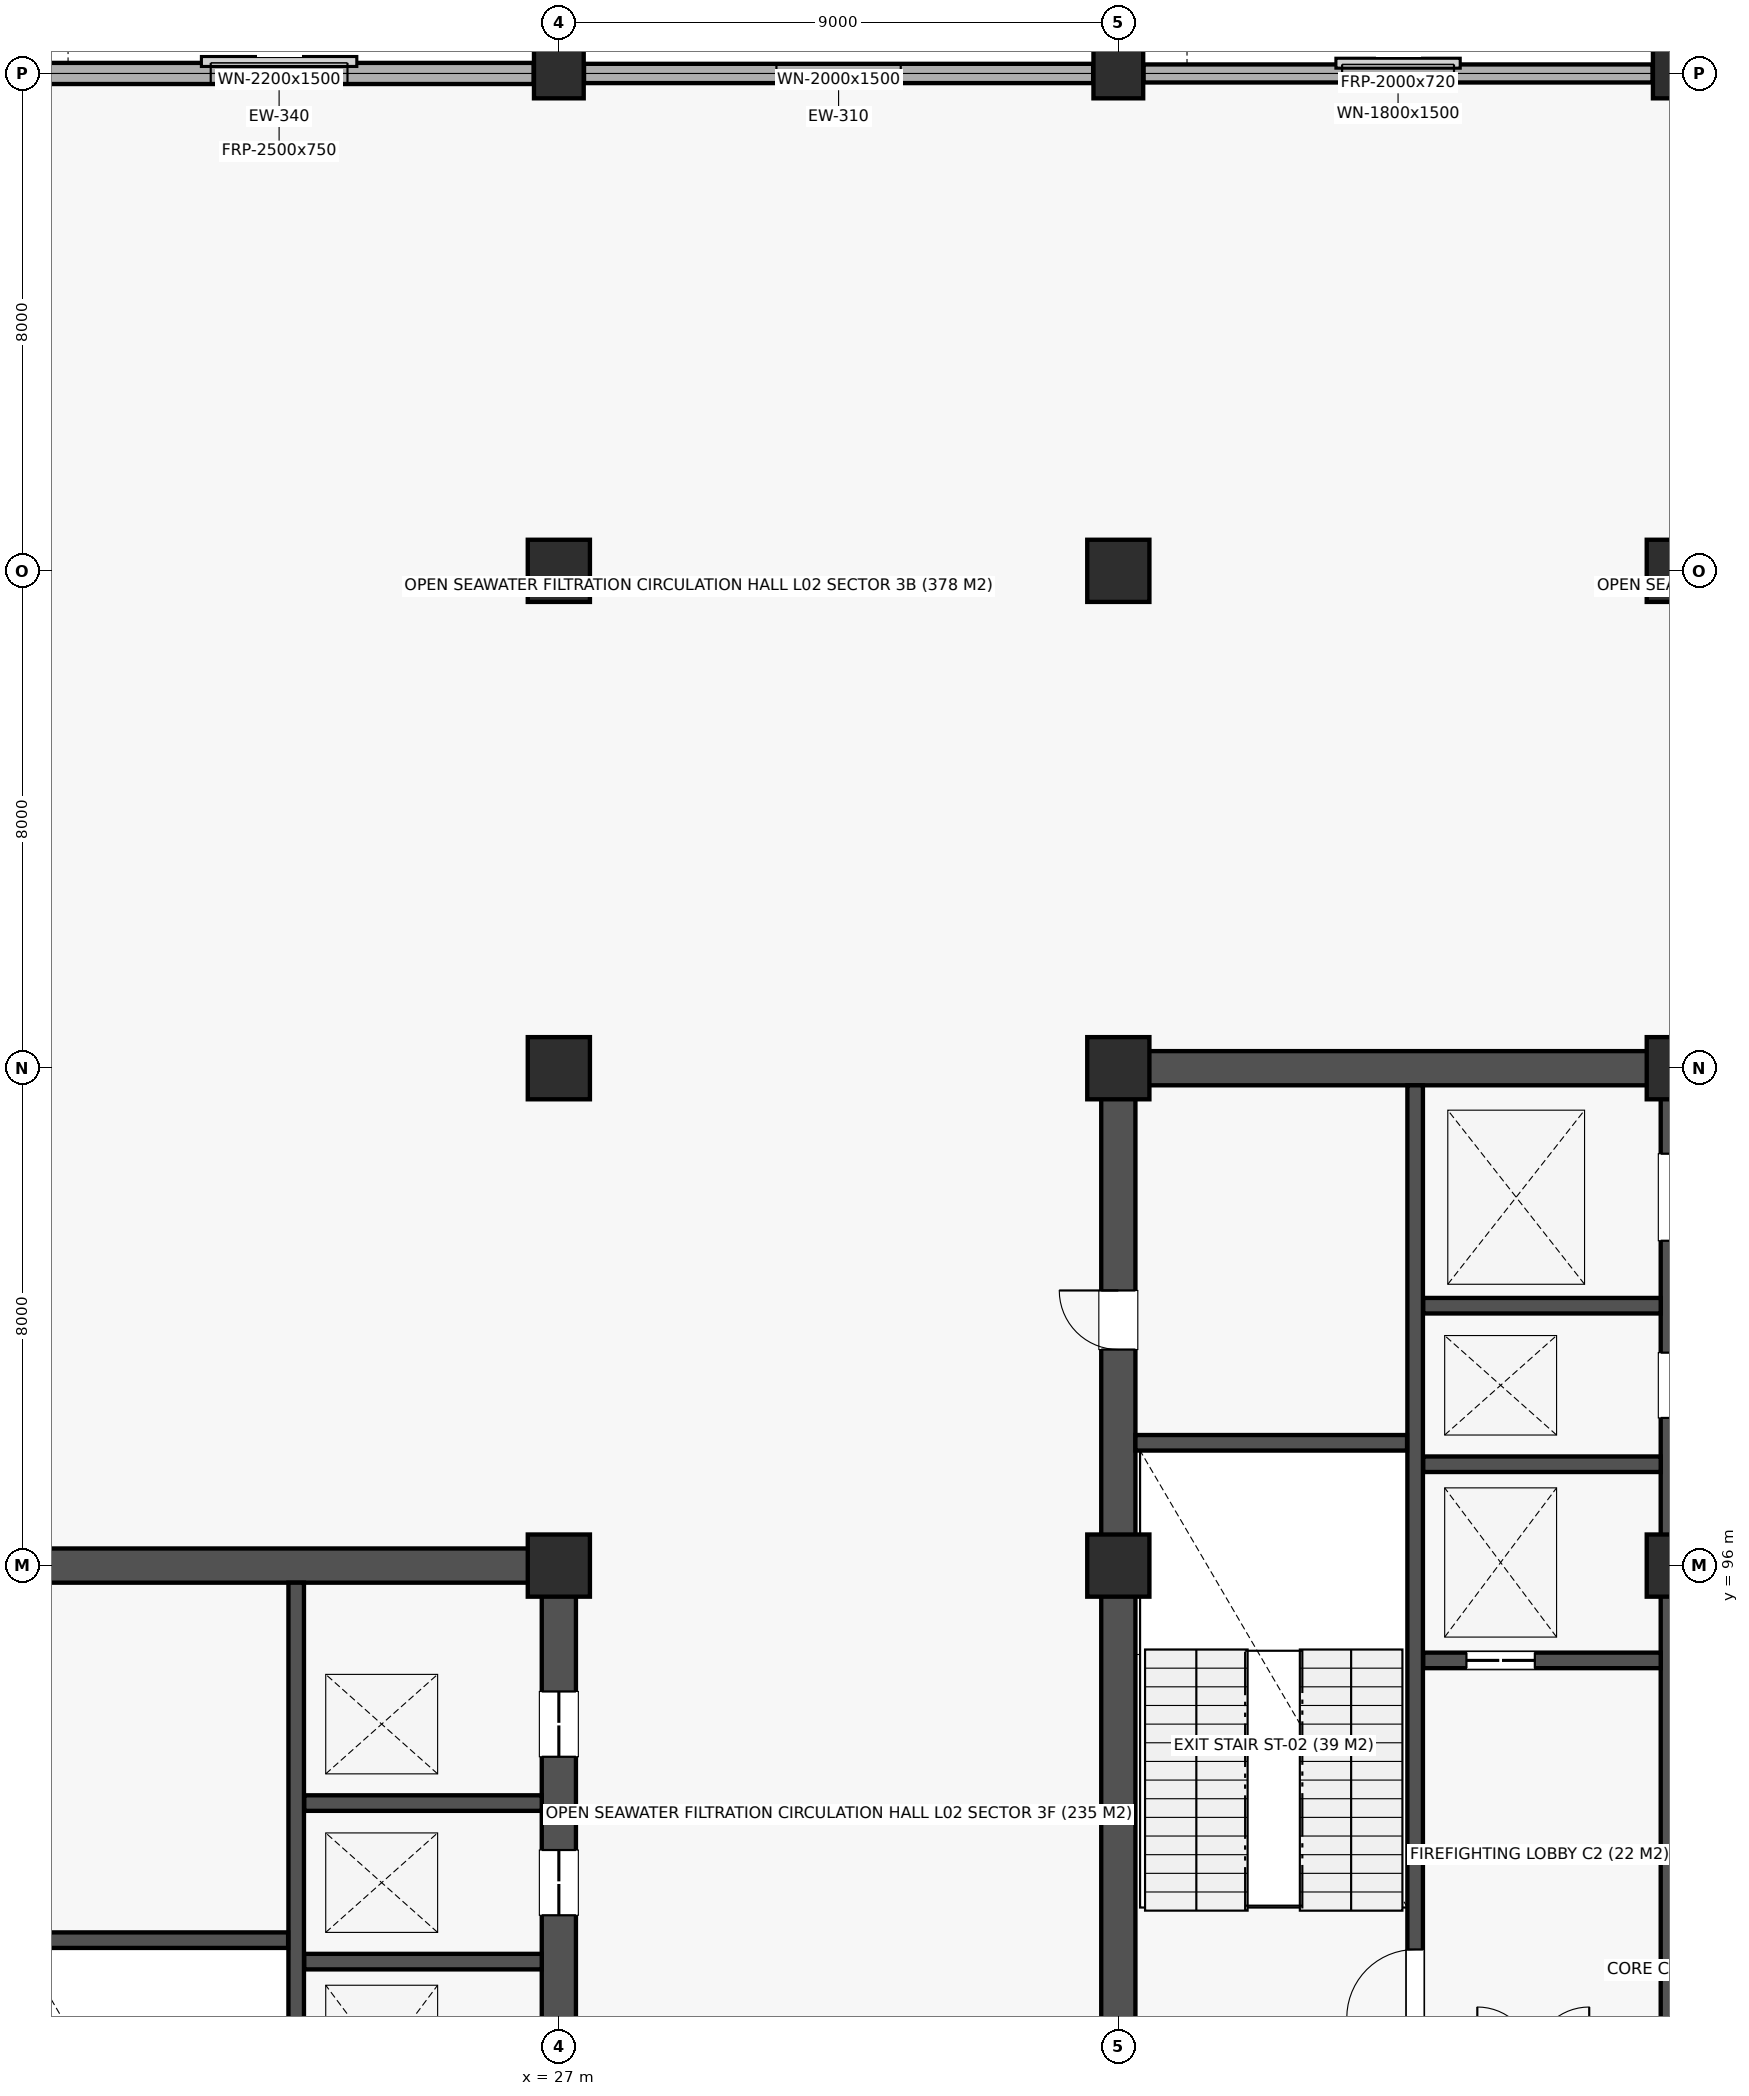
"""IFC4 building model, lengths in metres.
Left out: names, types, materials, properties, quantities, classifications, styles, units other than length and angle.
Written with IfcOpenShell. Run it as: python <this file> out.ifc"""

import sys

from ifc_helpers import new_model, si_unit, direction, frame, frame_2d, origin, origin_2d, place, context, subcontext, project, spatial, rectangle, extrude, element, fill, save


model = new_model("IFC4")
c1 = context("Model", 3, precision=1e-05, world=origin(), true_north=direction((0.0, 1.0)))
c2 = subcontext(c1, "Body", "Model", "MODEL_VIEW")
j1 = project(units=[si_unit("LENGTHUNIT", "METRE"), si_unit("PLANEANGLEUNIT", "RADIAN")], contexts=[c1])
p1 = place(None, origin())
s1 = spatial("IfcSite", under=j1, at=p1, CompositionType="ELEMENT")
p2 = place(p1, origin())
s2 = spatial("IfcBuilding", under=s1, at=p2, CompositionType="ELEMENT")
p3 = place(p2, frame((0.0, 0.0, 9.0)))
s3 = spatial("IfcBuildingStorey", under=s2, at=p3, CompositionType="ELEMENT", Elevation=9.0)
for number, where, z_axis, x_axis in (
    (1, (27.0, 96.0, 0.0), (0.0, 0.0, 1.0), (1.0, 0.0, 0.0)),
    (2, (27.0, 104.0, 0.0), (0.0, 0.0, 1.0), (1.0, 0.0, 0.0)),
    (3, (27.0, 112.0, 0.0), (0.0, 0.0, 1.0), (1.0, 0.0, 0.0)),
):
    element("IfcColumn", number, at=place(p3, frame(where, z_axis=z_axis, x_axis=x_axis)), inside=s3, PredefinedType="COLUMN", context=c2, shape_type="SweptSolid", body=[
        extrude(rectangle(XDim=1.0, YDim=1.0, at=origin_2d()), origin(), (0.0, 0.0, 1.0), 4.5),
    ])
p4 = place(p3, frame((27.0, 120.0, 0.0), z_axis=(0.0, 0.0, 1.0), x_axis=(1.0, 0.0, 0.0)))
e4 = element("IfcColumn", 4, at=p4, inside=s3, PredefinedType="COLUMN", context=c2, shape_type="SweptSolid", body=[
    extrude(rectangle(XDim=0.8, YDim=0.8, at=origin_2d()), origin(), (0.0, 0.0, 1.0), 4.5),
])
for number, where, z_axis, x_axis in (
    (5, (36.0, 96.0, 0.0), (0.0, 0.0, 1.0), (1.0, 0.0, 0.0)),
    (6, (36.0, 104.0, 0.0), (0.0, 0.0, 1.0), (1.0, 0.0, 0.0)),
    (7, (36.0, 112.0, 0.0), (0.0, 0.0, 1.0), (1.0, 0.0, 0.0)),
):
    element("IfcColumn", number, at=place(p3, frame(where, z_axis=z_axis, x_axis=x_axis)), inside=s3, PredefinedType="COLUMN", context=c2, shape_type="SweptSolid", body=[
        extrude(rectangle(XDim=1.0, YDim=1.0, at=origin_2d()), origin(), (0.0, 0.0, 1.0), 4.5),
    ])
p5 = place(p3, frame((36.0, 120.0, 0.0), z_axis=(0.0, 0.0, 1.0), x_axis=(1.0, 0.0, 0.0)))
e8 = element("IfcColumn", 8, at=p5, inside=s3, PredefinedType="COLUMN", context=c2, shape_type="SweptSolid", body=[
    extrude(rectangle(XDim=0.8, YDim=0.8, at=origin_2d()), origin(), (0.0, 0.0, 1.0), 4.5),
])
for number, where, z_axis, x_axis in (
    (9, (45.0, 96.0, 0.0), (0.0, 0.0, 1.0), (1.0, 0.0, 0.0)),
    (10, (45.0, 104.0, 0.0), (0.0, 0.0, 1.0), (1.0, 0.0, 0.0)),
    (11, (45.0, 112.0, 0.0), (0.0, 0.0, 1.0), (1.0, 0.0, 0.0)),
):
    element("IfcColumn", number, at=place(p3, frame(where, z_axis=z_axis, x_axis=x_axis)), inside=s3, PredefinedType="COLUMN", context=c2, shape_type="SweptSolid", body=[
        extrude(rectangle(XDim=1.0, YDim=1.0, at=origin_2d()), origin(), (0.0, 0.0, 1.0), 4.5),
    ])
p6 = place(p3, frame((45.0, 120.0, 0.0), z_axis=(0.0, 0.0, 1.0), x_axis=(1.0, 0.0, 0.0)))
e12 = element("IfcColumn", 12, at=p6, inside=s3, PredefinedType="COLUMN", context=c2, shape_type="SweptSolid", body=[
    extrude(rectangle(XDim=0.8, YDim=0.8, at=origin_2d()), origin(), (0.0, 0.0, 1.0), 4.5),
])
p7 = place(p3, frame((18.275, 96.0, 0.0), z_axis=(0.0, 0.0, 1.0), x_axis=(1.0, 0.0, 0.0)))
e13 = element("IfcWall", 13, at=p7, inside=s3, PredefinedType="SHEAR", context=c2, shape_type="SweptSolid", body=[
    extrude(rectangle(XDim=8.45, YDim=0.55, at=frame_2d((4.225, 0.0))), origin(), (0.0, 0.0, 1.0), 4.14),
])
p8 = place(p3, frame((27.0, 80.275, 0.0), z_axis=(0.0, 0.0, 1.0), x_axis=(0.0, 1.0, 0.0)))
e14 = element("IfcWall", 14, at=p8, inside=s3, PredefinedType="SHEAR", context=c2, shape_type="SweptSolid", body=[
    extrude(rectangle(XDim=15.45, YDim=0.55, at=frame_2d((7.725, 0.0))), origin(), (0.0, 0.0, 1.0), 4.14),
])
p9 = place(p8, frame((10.1, 0.0, 0.0)))
e15 = element("IfcOpeningElement", 15, at=p9, cuts=e14, PredefinedType="OPENING", context=c2, shape_type="SweptSolid", body=[
    extrude(rectangle(XDim=1.05, YDim=2.12, at=frame_2d((0.525, 1.06))), frame((0.0, 0.287, 0.0), z_axis=(0.0, -1.0, 0.0), x_axis=(1.0, 0.0, 0.0)), (0.0, 0.0, 1.0), 0.574),
])
p10 = place(p8, frame((12.65, 0.0, 0.0)))
e16 = element("IfcOpeningElement", 16, at=p10, cuts=e14, PredefinedType="OPENING", context=c2, shape_type="SweptSolid", body=[
    extrude(rectangle(XDim=1.05, YDim=2.12, at=frame_2d((0.525, 1.06))), frame((0.0, 0.287, 0.0), z_axis=(0.0, -1.0, 0.0), x_axis=(1.0, 0.0, 0.0)), (0.0, 0.0, 1.0), 0.574),
])
p11 = place(p3, frame((22.775, 80.275, 0.0), z_axis=(0.0, 0.0, 1.0), x_axis=(0.0, 1.0, 0.0)))
e17 = element("IfcWall", 17, at=p11, inside=s3, PredefinedType="SOLIDWALL", context=c2, shape_type="SweptSolid", body=[
    extrude(rectangle(XDim=15.45, YDim=0.25, at=frame_2d((7.725, 0.0))), origin(), (0.0, 0.0, 1.0), 4.14),
])
p12 = place(p11, frame((0.45, 0.0, 0.0)))
e18 = element("IfcOpeningElement", 18, at=p12, cuts=e17, PredefinedType="OPENING", context=c2, shape_type="SweptSolid", body=[
    extrude(rectangle(XDim=1.1, YDim=2.15, at=frame_2d((0.55, 1.075))), frame((0.0, 0.137, 0.0), z_axis=(0.0, -1.0, 0.0), x_axis=(1.0, 0.0, 0.0)), (0.0, 0.0, 1.0), 0.274),
])
p13 = place(p3, frame((18.275, 89.975, 0.0), z_axis=(0.0, 0.0, 1.0), x_axis=(1.0, 0.0, 0.0)))
e19 = element("IfcWall", 19, at=p13, inside=s3, PredefinedType="SOLIDWALL", context=c2, shape_type="SweptSolid", body=[
    extrude(rectangle(XDim=4.37, YDim=0.25, at=frame_2d((2.185, 0.0))), origin(), (0.0, 0.0, 1.0), 4.14),
])
for number, where, z_axis, x_axis in (
    (20, (22.905, 89.63, 0.0), (0.0, 0.0, 1.0), (1.0, 0.0, 0.0)),
    (21, (22.905, 92.18, 0.0), (0.0, 0.0, 1.0), (1.0, 0.0, 0.0)),
):
    element("IfcWall", number, at=place(p3, frame(where, z_axis=z_axis, x_axis=x_axis)), inside=s3, PredefinedType="SOLIDWALL", context=c2, shape_type="SweptSolid", body=[
        extrude(rectangle(XDim=3.82, YDim=0.25, at=frame_2d((1.91, 0.0))), origin(), (0.0, 0.0, 1.0), 4.14),
    ])
p14 = place(p3, frame((36.275, 104.0, 0.0), z_axis=(0.0, 0.0, 1.0), x_axis=(1.0, 0.0, 0.0)))
e22 = element("IfcWall", 22, at=p14, inside=s3, PredefinedType="SHEAR", context=c2, shape_type="SweptSolid", body=[
    extrude(rectangle(XDim=8.45, YDim=0.55, at=frame_2d((4.225, 0.0))), origin(), (0.0, 0.0, 1.0), 4.14),
])
p15 = place(p3, frame((36.0, 88.275, 0.0), z_axis=(0.0, 0.0, 1.0), x_axis=(0.0, 1.0, 0.0)))
e23 = element("IfcWall", 23, at=p15, inside=s3, PredefinedType="SHEAR", context=c2, shape_type="SweptSolid", body=[
    extrude(rectangle(XDim=15.45, YDim=0.55, at=frame_2d((7.725, 0.0))), origin(), (0.0, 0.0, 1.0), 4.14),
])
p16 = place(p15, frame((11.2, 0.0, 0.0)))
e24 = element("IfcOpeningElement", 24, at=p16, cuts=e23, PredefinedType="OPENING", context=c2, shape_type="SweptSolid", body=[
    extrude(rectangle(XDim=0.95, YDim=2.1, at=frame_2d((0.475, 1.05))), frame((0.0, 0.287, 0.0), z_axis=(0.0, -1.0, 0.0), x_axis=(1.0, 0.0, 0.0)), (0.0, 0.0, 1.0), 0.574),
])
p17 = place(p3, frame((45.0, 88.275, 0.0), z_axis=(0.0, 0.0, 1.0), x_axis=(0.0, 1.0, 0.0)))
e25 = element("IfcWall", 25, at=p17, inside=s3, PredefinedType="SHEAR", context=c2, shape_type="SweptSolid", body=[
    extrude(rectangle(XDim=15.45, YDim=0.55, at=frame_2d((7.725, 0.0))), origin(), (0.0, 0.0, 1.0), 4.14),
])
p18 = place(p17, frame((10.1, 0.0, 0.0)))
e26 = element("IfcOpeningElement", 26, at=p18, cuts=e25, PredefinedType="OPENING", context=c2, shape_type="SweptSolid", body=[
    extrude(rectangle(XDim=1.05, YDim=2.12, at=frame_2d((0.525, 1.06))), frame((0.0, 0.287, 0.0), z_axis=(0.0, -1.0, 0.0), x_axis=(1.0, 0.0, 0.0)), (0.0, 0.0, 1.0), 0.574),
])
p19 = place(p17, frame((12.95, 0.0, 0.0)))
e27 = element("IfcOpeningElement", 27, at=p19, cuts=e25, PredefinedType="OPENING", context=c2, shape_type="SweptSolid", body=[
    extrude(rectangle(XDim=1.4, YDim=2.2, at=frame_2d((0.7, 1.1))), frame((0.0, 0.287, 0.0), z_axis=(0.0, -1.0, 0.0), x_axis=(1.0, 0.0, 0.0)), (0.0, 0.0, 1.0), 0.574),
])
p20 = place(p3, frame((40.775, 88.275, 0.0), z_axis=(0.0, 0.0, 1.0), x_axis=(0.0, 1.0, 0.0)))
e28 = element("IfcWall", 28, at=p20, inside=s3, PredefinedType="SOLIDWALL", context=c2, shape_type="SweptSolid", body=[
    extrude(rectangle(XDim=15.45, YDim=0.25, at=frame_2d((7.725, 0.0))), origin(), (0.0, 0.0, 1.0), 4.14),
])
p21 = place(p20, frame((0.45, 0.0, 0.0)))
e29 = element("IfcOpeningElement", 29, at=p21, cuts=e28, PredefinedType="OPENING", context=c2, shape_type="SweptSolid", body=[
    extrude(rectangle(XDim=1.1, YDim=2.15, at=frame_2d((0.55, 1.075))), frame((0.0, 0.137, 0.0), z_axis=(0.0, -1.0, 0.0), x_axis=(1.0, 0.0, 0.0)), (0.0, 0.0, 1.0), 0.274),
])
p22 = place(p3, frame((36.275, 97.975, 0.0), z_axis=(0.0, 0.0, 1.0), x_axis=(1.0, 0.0, 0.0)))
e30 = element("IfcWall", 30, at=p22, inside=s3, PredefinedType="SOLIDWALL", context=c2, shape_type="SweptSolid", body=[
    extrude(rectangle(XDim=4.37, YDim=0.25, at=frame_2d((2.185, 0.0))), origin(), (0.0, 0.0, 1.0), 4.14),
])
p23 = place(p3, frame((40.905, 94.475, 0.0), z_axis=(0.0, 0.0, 1.0), x_axis=(1.0, 0.0, 0.0)))
e31 = element("IfcWall", 31, at=p23, inside=s3, PredefinedType="SOLIDWALL", context=c2, shape_type="SweptSolid", body=[
    extrude(rectangle(XDim=3.82, YDim=0.25, at=frame_2d((1.91, 0.0))), origin(), (0.0, 0.0, 1.0), 4.14),
])
p24 = place(p23, frame((0.695, 0.0, 0.0)))
e32 = element("IfcOpeningElement", 32, at=p24, cuts=e31, PredefinedType="OPENING", context=c2, shape_type="SweptSolid", body=[
    extrude(rectangle(XDim=1.1, YDim=2.12, at=frame_2d((0.55, 1.06))), frame((0.0, 0.137, 0.0), z_axis=(0.0, -1.0, 0.0), x_axis=(1.0, 0.0, 0.0)), (0.0, 0.0, 1.0), 0.274),
])
for number, where, z_axis, x_axis in (
    (33, (40.905, 97.63, 0.0), (0.0, 0.0, 1.0), (1.0, 0.0, 0.0)),
    (34, (40.905, 100.18, 0.0), (0.0, 0.0, 1.0), (1.0, 0.0, 0.0)),
):
    element("IfcWall", number, at=place(p3, frame(where, z_axis=z_axis, x_axis=x_axis)), inside=s3, PredefinedType="SOLIDWALL", context=c2, shape_type="SweptSolid", body=[
        extrude(rectangle(XDim=3.82, YDim=0.25, at=frame_2d((1.91, 0.0))), origin(), (0.0, 0.0, 1.0), 4.14),
    ])
p25 = place(p3, frame((18.405, 120.0, 0.0), z_axis=(0.0, 0.0, 1.0), x_axis=(1.0, 0.0, 0.0)))
e35 = element("IfcWall", 35, at=p25, inside=s3, PredefinedType="STANDARD", context=c2, shape_type="SweptSolid", body=[
    extrude(rectangle(XDim=8.19, YDim=0.34, at=frame_2d((4.095, 0.0))), origin(), (0.0, 0.0, 1.0), 3.42),
])
p26 = place(p25, frame((2.995, 0.0, 0.85)))
e36 = element("IfcOpeningElement", 36, at=p26, cuts=e35, PredefinedType="OPENING", context=c2, shape_type="SweptSolid", body=[
    extrude(rectangle(XDim=2.2, YDim=1.5, at=frame_2d((1.1, 0.75))), frame((0.0, 0.182, 0.0), z_axis=(0.0, -1.0, 0.0), x_axis=(1.0, 0.0, 0.0)), (0.0, 0.0, 1.0), 0.364),
])
p27 = place(p3, frame((27.405, 120.0, 0.0), z_axis=(0.0, 0.0, 1.0), x_axis=(1.0, 0.0, 0.0)))
e37 = element("IfcWall", 37, at=p27, inside=s3, PredefinedType="STANDARD", context=c2, shape_type="SweptSolid", body=[
    extrude(rectangle(XDim=8.19, YDim=0.31, at=frame_2d((4.095, 0.0))), origin(), (0.0, 0.0, 1.0), 3.42),
])
p28 = place(p27, frame((3.095, 0.0, 0.85)))
e38 = element("IfcOpeningElement", 38, at=p28, cuts=e37, PredefinedType="OPENING", context=c2, shape_type="SweptSolid", body=[
    extrude(rectangle(XDim=2.0, YDim=1.5, at=frame_2d((1.0, 0.75))), frame((0.0, 0.167, 0.0), z_axis=(0.0, -1.0, 0.0), x_axis=(1.0, 0.0, 0.0)), (0.0, 0.0, 1.0), 0.334),
])
p29 = place(p3, frame((36.405, 120.0, 0.0), z_axis=(0.0, 0.0, 1.0), x_axis=(1.0, 0.0, 0.0)))
e39 = element("IfcWall", 39, at=p29, inside=s3, PredefinedType="STANDARD", context=c2, shape_type="SweptSolid", body=[
    extrude(rectangle(XDim=8.19, YDim=0.29, at=frame_2d((4.095, 0.0))), origin(), (0.0, 0.0, 1.0), 3.42),
])
p30 = place(p29, frame((3.195, 0.0, 0.85)))
e40 = element("IfcOpeningElement", 40, at=p30, cuts=e39, PredefinedType="OPENING", context=c2, shape_type="SweptSolid", body=[
    extrude(rectangle(XDim=1.8, YDim=1.5, at=frame_2d((0.9, 0.75))), frame((0.0, 0.157, 0.0), z_axis=(0.0, -1.0, 0.0), x_axis=(1.0, 0.0, 0.0)), (0.0, 0.0, 1.0), 0.314),
])
p31 = place(p9, origin())
e41 = element("IfcDoor", 41, at=p31, inside=s3, OperationType="DOUBLE_DOOR_SLIDING", PredefinedType="DOOR", context=c2, shape_type="SweptSolid", body=[
    extrude(rectangle(XDim=1.05, YDim=2.12, at=frame_2d((0.525, 1.06))), frame((0.0, 0.025, 0.0), z_axis=(0.0, -1.0, 0.0), x_axis=(1.0, 0.0, 0.0)), (0.0, 0.0, 1.0), 0.05),
])
fill(e15, e41)
p32 = place(p10, origin())
e42 = element("IfcDoor", 42, at=p32, inside=s3, OperationType="DOUBLE_DOOR_SLIDING", PredefinedType="DOOR", context=c2, shape_type="SweptSolid", body=[
    extrude(rectangle(XDim=1.05, YDim=2.12, at=frame_2d((0.525, 1.06))), frame((0.0, 0.025, 0.0), z_axis=(0.0, -1.0, 0.0), x_axis=(1.0, 0.0, 0.0)), (0.0, 0.0, 1.0), 0.05),
])
fill(e16, e42)
p33 = place(p21, origin())
e43 = element("IfcDoor", 43, at=p33, inside=s3, OperationType="SINGLE_SWING_LEFT", PredefinedType="DOOR", context=c2, shape_type="SweptSolid", body=[
    extrude(rectangle(XDim=1.1, YDim=2.15, at=frame_2d((0.55, 1.075))), frame((0.0, 0.025, 0.0), z_axis=(0.0, -1.0, 0.0), x_axis=(1.0, 0.0, 0.0)), (0.0, 0.0, 1.0), 0.05),
])
fill(e29, e43)
p34 = place(p16, origin())
e44 = element("IfcDoor", 44, at=p34, inside=s3, OperationType="SINGLE_SWING_RIGHT", PredefinedType="DOOR", context=c2, shape_type="SweptSolid", body=[
    extrude(rectangle(XDim=0.95, YDim=2.1, at=frame_2d((0.475, 1.05))), frame((0.0, 0.025, 0.0), z_axis=(0.0, -1.0, 0.0), x_axis=(1.0, 0.0, 0.0)), (0.0, 0.0, 1.0), 0.05),
])
fill(e24, e44)
p35 = place(p24, origin())
e45 = element("IfcDoor", 45, at=p35, inside=s3, OperationType="DOUBLE_DOOR_SLIDING", PredefinedType="DOOR", context=c2, shape_type="SweptSolid", body=[
    extrude(rectangle(XDim=1.1, YDim=2.12, at=frame_2d((0.55, 1.06))), frame((0.0, 0.025, 0.0), z_axis=(0.0, -1.0, 0.0), x_axis=(1.0, 0.0, 0.0)), (0.0, 0.0, 1.0), 0.05),
])
fill(e32, e45)
p36 = place(p26, origin())
e46 = element("IfcWindow", 46, at=p36, inside=s3, PartitioningType="SINGLE_PANEL", PredefinedType="WINDOW", context=c2, shape_type="SweptSolid", body=[
    extrude(rectangle(XDim=2.2, YDim=1.5, at=frame_2d((1.1, 0.75))), frame((0.0, 0.03, 0.0), z_axis=(0.0, -1.0, 0.0), x_axis=(1.0, 0.0, 0.0)), (0.0, 0.0, 1.0), 0.06),
])
fill(e36, e46)
p37 = place(p28, origin())
e47 = element("IfcWindow", 47, at=p37, inside=s3, PartitioningType="SINGLE_PANEL", PredefinedType="WINDOW", context=c2, shape_type="SweptSolid", body=[
    extrude(rectangle(XDim=2.0, YDim=1.5, at=frame_2d((1.0, 0.75))), frame((0.0, 0.03, 0.0), z_axis=(0.0, -1.0, 0.0), x_axis=(1.0, 0.0, 0.0)), (0.0, 0.0, 1.0), 0.06),
])
fill(e38, e47)
p38 = place(p30, origin())
e48 = element("IfcWindow", 48, at=p38, inside=s3, PartitioningType="SINGLE_PANEL", PredefinedType="WINDOW", context=c2, shape_type="SweptSolid", body=[
    extrude(rectangle(XDim=1.8, YDim=1.5, at=frame_2d((0.9, 0.75))), frame((0.0, 0.03, 0.0), z_axis=(0.0, -1.0, 0.0), x_axis=(1.0, 0.0, 0.0)), (0.0, 0.0, 1.0), 0.06),
])
fill(e40, e48)
save(model, sys.argv[1])
